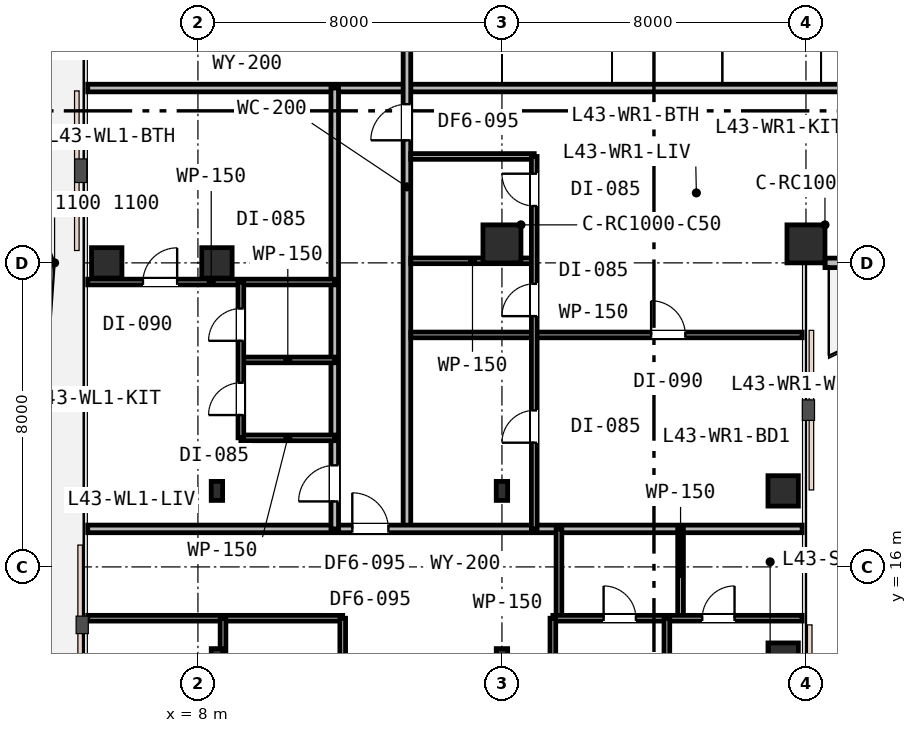
"""IFC4 building model, lengths in metres.
Left out: names, types, materials, properties, quantities, classifications, styles, units other than length and angle.
Written with IfcOpenShell. Run it as: python <this file> out.ifc"""

import sys

from ifc_helpers import new_model, si_unit, direction, frame, frame_2d, origin, origin_2d, place, context, subcontext, project, spatial, rectangle, i_section, extrude, element, fill, save


model = new_model("IFC4")
c1 = context("Model", 3, precision=1e-05, world=origin(), true_north=direction((0.0, 1.0)))
c2 = subcontext(c1, "Body", "Model", "MODEL_VIEW")
j1 = project(units=[si_unit("LENGTHUNIT", "METRE"), si_unit("PLANEANGLEUNIT", "RADIAN")], contexts=[c1])
p1 = place(None, origin())
s1 = spatial("IfcSite", under=j1, at=p1, CompositionType="ELEMENT")
p2 = place(p1, origin())
s2 = spatial("IfcBuilding", under=s1, at=p2, CompositionType="ELEMENT")
p3 = place(p2, frame((0.0, 0.0, 168.6)))
s3 = spatial("IfcBuildingStorey", under=s2, at=p3, CompositionType="ELEMENT", Elevation=168.6)
p4 = place(p3, frame((8.5, 24.0, 0.0), z_axis=(0.0, 0.0, 1.0), x_axis=(1.0, 0.0, 0.0)))
e1 = element("IfcColumn", 1, at=p4, inside=s3, PredefinedType="COLUMN", context=c2, shape_type="SweptSolid", body=[
    extrude(rectangle(XDim=0.8, YDim=0.8, at=origin_2d()), origin(), (0.0, 0.0, 1.0), 3.6),
])
for number, where, z_axis, x_axis in (
    (2, (16.0, 24.5, 0.0), (0.0, 0.0, 1.0), (1.0, 0.0, 0.0)),
    (3, (24.0, 24.5, 0.0), (0.0, 0.0, 1.0), (1.0, 0.0, 0.0)),
):
    element("IfcColumn", number, at=place(p3, frame(where, z_axis=z_axis, x_axis=x_axis)), inside=s3, PredefinedType="COLUMN", context=c2, shape_type="SweptSolid", body=[
        extrude(rectangle(XDim=1.0, YDim=1.0, at=origin_2d()), origin(), (0.0, 0.0, 1.0), 3.6),
    ])
for number, where, z_axis, x_axis in (
    (4, (5.6, 24.0, 0.0), (0.0, 0.0, 1.0), (1.0, 0.0, 0.0)),
    (5, (23.4, 13.6, 0.0), (0.0, 0.0, 1.0), (1.0, 0.0, 0.0)),
    (6, (23.4, 18.0, 0.0), (0.0, 0.0, 1.0), (1.0, 0.0, 0.0)),
):
    element("IfcColumn", number, at=place(p3, frame(where, z_axis=z_axis, x_axis=x_axis)), inside=s3, PredefinedType="COLUMN", context=c2, shape_type="SweptSolid", body=[
        extrude(rectangle(XDim=0.8, YDim=0.8, at=origin_2d()), origin(), (0.0, 0.0, 1.0), 3.6),
    ])
for number, where, z_axis, x_axis in (
    (7, (8.5, 13.6, 0.0), (0.0, 0.0, 1.0), (1.0, 0.0, 0.0)),
    (8, (16.0, 13.6, 0.0), (0.0, 0.0, 1.0), (1.0, 0.0, 0.0)),
    (9, (8.5, 18.0, 0.0), (0.0, 0.0, 1.0), (1.0, 0.0, 0.0)),
    (10, (16.0, 18.0, 0.0), (0.0, 0.0, 1.0), (1.0, 0.0, 0.0)),
):
    element("IfcColumn", number, at=place(p3, frame(where, z_axis=z_axis, x_axis=x_axis)), inside=s3, PredefinedType="COLUMN", context=c2, shape_type="SweptSolid", body=[
        extrude(i_section(OverallWidth=0.3, OverallDepth=0.5, WebThickness=0.015, FlangeThickness=0.028, FilletRadius=0.027, at=origin_2d()), origin(), (0.0, 0.0, 1.0), 3.6),
    ])
p5 = place(p3, frame((24.5, 24.0, 0.0), z_axis=(0.0, 0.0, 1.0), x_axis=(1.0, 0.0, 0.0)))
e11 = element("IfcWall", 11, at=p5, inside=s3, PredefinedType="STANDARD", context=c2, shape_type="SweptSolid", body=[
    extrude(rectangle(XDim=1.35, YDim=0.25, at=frame_2d((0.675, 0.0))), origin(), (0.0, 0.0, 1.0), 3.02),
])
p6 = place(p3, frame((5.1, 28.6, 0.0), z_axis=(0.0, 0.0, 1.0), x_axis=(1.0, 0.0, 0.0)))
e12 = element("IfcWall", 12, at=p6, inside=s3, PredefinedType="PARTITIONING", context=c2, shape_type="SweptSolid", body=[
    extrude(rectangle(XDim=8.4, YDim=0.2, at=frame_2d((4.2, 0.0))), origin(), (0.0, 0.0, 1.0), 2.92),
])
p7 = place(p3, frame((13.6, 28.6, 0.0), z_axis=(0.0, 0.0, 1.0), x_axis=(1.0, 0.0, 0.0)))
e13 = element("IfcWall", 13, at=p7, inside=s3, PredefinedType="PARTITIONING", context=c2, shape_type="SweptSolid", body=[
    extrude(rectangle(XDim=37.3, YDim=0.2, at=frame_2d((18.65, 0.0))), origin(), (0.0, 0.0, 1.0), 2.92),
])
p8 = place(p7, frame((16.025, 0.0, 0.0)))
e14 = element("IfcOpeningElement", 14, at=p8, cuts=e13, PredefinedType="OPENING", context=c2, shape_type="SweptSolid", body=[
    extrude(rectangle(XDim=0.95, YDim=2.15, at=frame_2d((0.475, 1.075))), frame((0.0, 0.11, 0.0), z_axis=(0.0, -1.0, 0.0), x_axis=(1.0, 0.0, 0.0)), (0.0, 0.0, 1.0), 0.22),
])
p9 = place(p7, frame((25.925, 0.0, 0.0)))
e15 = element("IfcOpeningElement", 15, at=p9, cuts=e13, PredefinedType="OPENING", context=c2, shape_type="SweptSolid", body=[
    extrude(rectangle(XDim=0.95, YDim=2.15, at=frame_2d((0.475, 1.075))), frame((0.0, 0.11, 0.0), z_axis=(0.0, -1.0, 0.0), x_axis=(1.0, 0.0, 0.0)), (0.0, 0.0, 1.0), 0.22),
])
p10 = place(p3, frame((13.5, 17.0, 0.0), z_axis=(0.0, 0.0, 1.0), x_axis=(0.0, 1.0, 0.0)))
e16 = element("IfcWall", 16, at=p10, inside=s3, PredefinedType="PARTITIONING", context=c2, shape_type="SweptSolid", body=[
    extrude(rectangle(XDim=18.0, YDim=0.2, at=frame_2d((9.0, 0.0))), origin(), (0.0, 0.0, 1.0), 2.92),
])
p11 = place(p10, frame((15.425, 0.0, 0.0)))
e17 = element("IfcOpeningElement", 17, at=p11, cuts=e16, PredefinedType="OPENING", context=c2, shape_type="SweptSolid", body=[
    extrude(rectangle(XDim=0.95, YDim=2.15, at=frame_2d((0.475, 1.075))), frame((0.0, 0.11, 0.0), z_axis=(0.0, -1.0, 0.0), x_axis=(1.0, 0.0, 0.0)), (0.0, 0.0, 1.0), 0.22),
])
p12 = place(p10, frame((10.225, 0.0, 0.0)))
e18 = element("IfcOpeningElement", 18, at=p12, cuts=e16, PredefinedType="OPENING", context=c2, shape_type="SweptSolid", body=[
    extrude(rectangle(XDim=0.95, YDim=2.15, at=frame_2d((0.475, 1.075))), frame((0.0, 0.11, 0.0), z_axis=(0.0, -1.0, 0.0), x_axis=(1.0, 0.0, 0.0)), (0.0, 0.0, 1.0), 0.22),
])
p13 = place(p3, frame((5.1, 17.0, 0.0), z_axis=(0.0, 0.0, 1.0), x_axis=(1.0, 0.0, 0.0)))
e19 = element("IfcWall", 19, at=p13, inside=s3, PredefinedType="PARTITIONING", context=c2, shape_type="SweptSolid", body=[
    extrude(rectangle(XDim=18.8, YDim=0.2, at=frame_2d((9.4, 0.0))), origin(), (0.0, 0.0, 1.0), 2.92),
])
p14 = place(p13, frame((6.962, 0.0, 0.0)))
e20 = element("IfcOpeningElement", 20, at=p14, cuts=e19, PredefinedType="OPENING", context=c2, shape_type="SweptSolid", body=[
    extrude(rectangle(XDim=0.95, YDim=2.15, at=frame_2d((0.475, 1.075))), frame((0.0, 0.11, 0.0), z_axis=(0.0, -1.0, 0.0), x_axis=(1.0, 0.0, 0.0)), (0.0, 0.0, 1.0), 0.22),
])
p15 = place(p3, frame((11.6, 17.0, 0.0), z_axis=(0.0, 0.0, 1.0), x_axis=(0.0, 1.0, 0.0)))
e21 = element("IfcWall", 21, at=p15, inside=s3, PredefinedType="PARTITIONING", context=c2, shape_type="SweptSolid", body=[
    extrude(rectangle(XDim=11.6, YDim=0.2, at=frame_2d((5.8, 0.0))), origin(), (0.0, 0.0, 1.0), 2.92),
])
p16 = place(p15, frame((0.723, 0.0, 0.0)))
e22 = element("IfcOpeningElement", 22, at=p16, cuts=e21, PredefinedType="OPENING", context=c2, shape_type="SweptSolid", body=[
    extrude(rectangle(XDim=0.95, YDim=2.15, at=frame_2d((0.475, 1.075))), frame((0.0, 0.11, 0.0), z_axis=(0.0, -1.0, 0.0), x_axis=(1.0, 0.0, 0.0)), (0.0, 0.0, 1.0), 0.22),
])
for number, where, z_axis, x_axis in (
    (23, (9.13, 19.396, 0.0), (0.0, 0.0, 1.0), (1.0, 0.0, 0.0)),
    (24, (9.13, 21.446, 0.0), (0.0, 0.0, 1.0), (1.0, 0.0, 0.0)),
):
    element("IfcWall", number, at=place(p3, frame(where, z_axis=z_axis, x_axis=x_axis)), inside=s3, PredefinedType="PARTITIONING", context=c2, shape_type="SweptSolid", body=[
        extrude(rectangle(XDim=2.47, YDim=0.15, at=frame_2d((1.235, 0.0))), origin(), (0.0, 0.0, 1.0), 3.33),
    ])
p17 = place(p3, frame((5.1, 23.496, 0.0), z_axis=(0.0, 0.0, 1.0), x_axis=(1.0, 0.0, 0.0)))
e25 = element("IfcWall", 25, at=p17, inside=s3, PredefinedType="PARTITIONING", context=c2, shape_type="SweptSolid", body=[
    extrude(rectangle(XDim=6.5, YDim=0.15, at=frame_2d((3.25, 0.0))), origin(), (0.0, 0.0, 1.0), 2.92),
])
p18 = place(p17, frame((1.453, 0.0, 0.0)))
e26 = element("IfcOpeningElement", 26, at=p18, cuts=e25, PredefinedType="OPENING", context=c2, shape_type="SweptSolid", body=[
    extrude(rectangle(XDim=0.9, YDim=2.15, at=frame_2d((0.45, 1.075))), frame((0.0, 0.085, 0.0), z_axis=(0.0, -1.0, 0.0), x_axis=(1.0, 0.0, 0.0)), (0.0, 0.0, 1.0), 0.17),
])
p19 = place(p3, frame((9.13, 19.396, 0.0), z_axis=(0.0, 0.0, 1.0), x_axis=(0.0, 1.0, 0.0)))
e27 = element("IfcWall", 27, at=p19, inside=s3, PredefinedType="PARTITIONING", context=c2, shape_type="SweptSolid", body=[
    extrude(rectangle(XDim=4.1, YDim=0.15, at=frame_2d((2.05, 0.0))), origin(), (0.0, 0.0, 1.0), 2.92),
])
p20 = place(p19, frame((0.6, 0.0, 0.0)))
e28 = element("IfcOpeningElement", 28, at=p20, cuts=e27, PredefinedType="OPENING", context=c2, shape_type="SweptSolid", body=[
    extrude(rectangle(XDim=0.85, YDim=2.15, at=frame_2d((0.425, 1.075))), frame((0.0, 0.085, 0.0), z_axis=(0.0, -1.0, 0.0), x_axis=(1.0, 0.0, 0.0)), (0.0, 0.0, 1.0), 0.17),
])
p21 = place(p19, frame((2.553, 0.0, 0.0)))
e29 = element("IfcOpeningElement", 29, at=p21, cuts=e27, PredefinedType="OPENING", context=c2, shape_type="SweptSolid", body=[
    extrude(rectangle(XDim=0.85, YDim=2.15, at=frame_2d((0.425, 1.075))), frame((0.0, 0.085, 0.0), z_axis=(0.0, -1.0, 0.0), x_axis=(1.0, 0.0, 0.0)), (0.0, 0.0, 1.0), 0.17),
])
p22 = place(p3, frame((13.6, 22.104, 0.0), z_axis=(0.0, 0.0, 1.0), x_axis=(1.0, 0.0, 0.0)))
e30 = element("IfcWall", 30, at=p22, inside=s3, PredefinedType="PARTITIONING", context=c2, shape_type="SweptSolid", body=[
    extrude(rectangle(XDim=10.3, YDim=0.15, at=frame_2d((5.15, 0.0))), origin(), (0.0, 0.0, 1.0), 2.92),
])
p23 = place(p22, frame((6.325, 0.0, 0.0)))
e31 = element("IfcOpeningElement", 31, at=p23, cuts=e30, PredefinedType="OPENING", context=c2, shape_type="SweptSolid", body=[
    extrude(rectangle(XDim=0.9, YDim=2.15, at=frame_2d((0.45, 1.075))), frame((0.0, 0.085, 0.0), z_axis=(0.0, -1.0, 0.0), x_axis=(1.0, 0.0, 0.0)), (0.0, 0.0, 1.0), 0.17),
])
for number, where, z_axis, x_axis in (
    (32, (13.6, 24.054, 0.0), (0.0, 0.0, 1.0), (1.0, 0.0, 0.0)),
    (33, (13.6, 26.8, 0.0), (0.0, 0.0, 1.0), (1.0, 0.0, 0.0)),
):
    element("IfcWall", number, at=place(p3, frame(where, z_axis=z_axis, x_axis=x_axis)), inside=s3, PredefinedType="PARTITIONING", context=c2, shape_type="SweptSolid", body=[
        extrude(rectangle(XDim=3.25, YDim=0.15, at=frame_2d((1.625, 0.0))), origin(), (0.0, 0.0, 1.0), 2.92),
    ])
p24 = place(p3, frame((16.85, 17.0, 0.0), z_axis=(0.0, 0.0, 1.0), x_axis=(0.0, 1.0, 0.0)))
e34 = element("IfcWall", 34, at=p24, inside=s3, PredefinedType="PARTITIONING", context=c2, shape_type="SweptSolid", body=[
    extrude(rectangle(XDim=9.8, YDim=0.15, at=frame_2d((4.9, 0.0))), origin(), (0.0, 0.0, 1.0), 2.92),
])
p25 = place(p24, frame((5.598, 0.0, 0.0)))
e35 = element("IfcOpeningElement", 35, at=p25, cuts=e34, PredefinedType="OPENING", context=c2, shape_type="SweptSolid", body=[
    extrude(rectangle(XDim=0.85, YDim=2.15, at=frame_2d((0.425, 1.075))), frame((0.0, 0.085, 0.0), z_axis=(0.0, -1.0, 0.0), x_axis=(1.0, 0.0, 0.0)), (0.0, 0.0, 1.0), 0.17),
])
p26 = place(p24, frame((8.496, 0.0, 0.0)))
e36 = element("IfcOpeningElement", 36, at=p26, cuts=e34, PredefinedType="OPENING", context=c2, shape_type="SweptSolid", body=[
    extrude(rectangle(XDim=0.85, YDim=2.15, at=frame_2d((0.425, 1.075))), frame((0.0, 0.085, 0.0), z_axis=(0.0, -1.0, 0.0), x_axis=(1.0, 0.0, 0.0)), (0.0, 0.0, 1.0), 0.17),
])
p27 = place(p24, frame((2.268, 0.0, 0.0)))
e37 = element("IfcOpeningElement", 37, at=p27, cuts=e34, PredefinedType="OPENING", context=c2, shape_type="SweptSolid", body=[
    extrude(rectangle(XDim=0.85, YDim=2.15, at=frame_2d((0.425, 1.075))), frame((0.0, 0.085, 0.0), z_axis=(0.0, -1.0, 0.0), x_axis=(1.0, 0.0, 0.0)), (0.0, 0.0, 1.0), 0.17),
])
p28 = place(p3, frame((17.5, 14.65, 0.0), z_axis=(0.0, 0.0, 1.0), x_axis=(0.0, 1.0, 0.0)))
e38 = element("IfcWall", 38, at=p28, inside=s3, PredefinedType="PARTITIONING", context=c2, shape_type="SweptSolid", body=[
    extrude(rectangle(XDim=2.35, YDim=0.15, at=frame_2d((1.175, 0.0))), origin(), (0.0, 0.0, 1.0), 3.33),
])
p29 = place(p3, frame((20.7, 14.65, 0.0), z_axis=(0.0, 0.0, 1.0), x_axis=(0.0, 1.0, 0.0)))
e39 = element("IfcWall", 39, at=p29, inside=s3, PredefinedType="PARTITIONING", context=c2, shape_type="SweptSolid", body=[
    extrude(rectangle(XDim=2.35, YDim=0.15, at=frame_2d((1.175, 0.0))), origin(), (0.0, 0.0, 1.0), 3.07),
])
p30 = place(p3, frame((17.34, 14.65, 0.0), z_axis=(0.0, 0.0, 1.0), x_axis=(1.0, 0.0, 0.0)))
e40 = element("IfcWall", 40, at=p30, inside=s3, PredefinedType="PARTITIONING", context=c2, shape_type="SweptSolid", body=[
    extrude(rectangle(XDim=6.56, YDim=0.15, at=frame_2d((3.28, 0.0))), origin(), (0.0, 0.0, 1.0), 3.02),
])
p31 = place(p30, frame((1.335, 0.0, 0.0)))
e41 = element("IfcOpeningElement", 41, at=p31, cuts=e40, PredefinedType="OPENING", context=c2, shape_type="SweptSolid", body=[
    extrude(rectangle(XDim=0.85, YDim=2.15, at=frame_2d((0.425, 1.075))), frame((0.0, 0.085, 0.0), z_axis=(0.0, -1.0, 0.0), x_axis=(1.0, 0.0, 0.0)), (0.0, 0.0, 1.0), 0.17),
])
p32 = place(p30, frame((3.93, 0.0, 0.0)))
e42 = element("IfcOpeningElement", 42, at=p32, cuts=e40, PredefinedType="OPENING", context=c2, shape_type="SweptSolid", body=[
    extrude(rectangle(XDim=0.85, YDim=2.15, at=frame_2d((0.425, 1.075))), frame((0.0, 0.085, 0.0), z_axis=(0.0, -1.0, 0.0), x_axis=(1.0, 0.0, 0.0)), (0.0, 0.0, 1.0), 0.17),
])
p33 = place(p3, frame((5.1, 14.65, 0.0), z_axis=(0.0, 0.0, 1.0), x_axis=(1.0, 0.0, 0.0)))
e43 = element("IfcWall", 43, at=p33, inside=s3, PredefinedType="PARTITIONING", context=c2, shape_type="SweptSolid", body=[
    extrude(rectangle(XDim=6.71, YDim=0.15, at=frame_2d((3.355, 0.0))), origin(), (0.0, 0.0, 1.0), 2.92),
])
p34 = place(p3, frame((8.66, 5.1, 0.0), z_axis=(0.0, 0.0, 1.0), x_axis=(0.0, 1.0, 0.0)))
e44 = element("IfcWall", 44, at=p34, inside=s3, PredefinedType="PARTITIONING", context=c2, shape_type="SweptSolid", body=[
    extrude(rectangle(XDim=9.55, YDim=0.15, at=frame_2d((4.775, 0.0))), origin(), (0.0, 0.0, 1.0), 2.92),
])
p35 = place(p34, frame((4.779, 0.0, 0.0)))
e45 = element("IfcOpeningElement", 45, at=p35, cuts=e44, PredefinedType="OPENING", context=c2, shape_type="SweptSolid", body=[
    extrude(rectangle(XDim=0.9, YDim=2.15, at=frame_2d((0.45, 1.075))), frame((0.0, 0.085, 0.0), z_axis=(0.0, -1.0, 0.0), x_axis=(1.0, 0.0, 0.0)), (0.0, 0.0, 1.0), 0.17),
])
p36 = place(p3, frame((20.34, 5.1, 0.0), z_axis=(0.0, 0.0, 1.0), x_axis=(0.0, 1.0, 0.0)))
e46 = element("IfcWall", 46, at=p36, inside=s3, PredefinedType="PARTITIONING", context=c2, shape_type="SweptSolid", body=[
    extrude(rectangle(XDim=9.55, YDim=0.15, at=frame_2d((4.775, 0.0))), origin(), (0.0, 0.0, 1.0), 2.92),
])
p37 = place(p36, frame((4.325, 0.0, 0.0)))
e47 = element("IfcOpeningElement", 47, at=p37, cuts=e46, PredefinedType="OPENING", context=c2, shape_type="SweptSolid", body=[
    extrude(rectangle(XDim=0.9, YDim=2.15, at=frame_2d((0.45, 1.075))), frame((0.0, 0.085, 0.0), z_axis=(0.0, -1.0, 0.0), x_axis=(1.0, 0.0, 0.0)), (0.0, 0.0, 1.0), 0.17),
])
p38 = place(p3, frame((17.34, 5.1, 0.0), z_axis=(0.0, 0.0, 1.0), x_axis=(0.0, 1.0, 0.0)))
e48 = element("IfcWall", 48, at=p38, inside=s3, PredefinedType="PARTITIONING", context=c2, shape_type="SweptSolid", body=[
    extrude(rectangle(XDim=9.55, YDim=0.15, at=frame_2d((4.775, 0.0))), origin(), (0.0, 0.0, 1.0), 2.92),
])
p39 = place(p38, frame((4.779, 0.0, 0.0)))
e49 = element("IfcOpeningElement", 49, at=p39, cuts=e48, PredefinedType="OPENING", context=c2, shape_type="SweptSolid", body=[
    extrude(rectangle(XDim=0.9, YDim=2.15, at=frame_2d((0.45, 1.075))), frame((0.0, 0.085, 0.0), z_axis=(0.0, -1.0, 0.0), x_axis=(1.0, 0.0, 0.0)), (0.0, 0.0, 1.0), 0.17),
])
p40 = place(p3, frame((11.81, 5.1, 0.0), z_axis=(0.0, 0.0, 1.0), x_axis=(0.0, 1.0, 0.0)))
e50 = element("IfcWall", 50, at=p40, inside=s3, PredefinedType="PARTITIONING", context=c2, shape_type="SweptSolid", body=[
    extrude(rectangle(XDim=9.55, YDim=0.15, at=frame_2d((4.775, 0.0))), origin(), (0.0, 0.0, 1.0), 2.92),
])
p41 = place(p40, frame((4.325, 0.0, 0.0)))
e51 = element("IfcOpeningElement", 51, at=p41, cuts=e50, PredefinedType="OPENING", context=c2, shape_type="SweptSolid", body=[
    extrude(rectangle(XDim=0.9, YDim=2.15, at=frame_2d((0.45, 1.075))), frame((0.0, 0.085, 0.0), z_axis=(0.0, -1.0, 0.0), x_axis=(1.0, 0.0, 0.0)), (0.0, 0.0, 1.0), 0.17),
])
p42 = place(p16, origin())
e52 = element("IfcDoor", 52, at=p42, inside=s3, OperationType="SINGLE_SWING_LEFT", PredefinedType="DOOR", context=c2, shape_type="SweptSolid", body=[
    extrude(rectangle(XDim=0.95, YDim=2.15, at=frame_2d((0.475, 1.075))), frame((0.0, 0.025, 0.0), z_axis=(0.0, -1.0, 0.0), x_axis=(1.0, 0.0, 0.0)), (0.0, 0.0, 1.0), 0.05),
])
fill(e22, e52)
p43 = place(p20, origin())
e53 = element("IfcDoor", 53, at=p43, inside=s3, OperationType="SINGLE_SWING_LEFT", PredefinedType="DOOR", context=c2, shape_type="SweptSolid", body=[
    extrude(rectangle(XDim=0.85, YDim=2.15, at=frame_2d((0.425, 1.075))), frame((0.0, 0.025, 0.0), z_axis=(0.0, -1.0, 0.0), x_axis=(1.0, 0.0, 0.0)), (0.0, 0.0, 1.0), 0.05),
])
fill(e28, e53)
p44 = place(p21, origin())
e54 = element("IfcDoor", 54, at=p44, inside=s3, OperationType="SINGLE_SWING_LEFT", PredefinedType="DOOR", context=c2, shape_type="SweptSolid", body=[
    extrude(rectangle(XDim=0.85, YDim=2.15, at=frame_2d((0.425, 1.075))), frame((0.0, 0.025, 0.0), z_axis=(0.0, -1.0, 0.0), x_axis=(1.0, 0.0, 0.0)), (0.0, 0.0, 1.0), 0.05),
])
fill(e29, e54)
p45 = place(p18, origin())
e55 = element("IfcDoor", 55, at=p45, inside=s3, OperationType="SINGLE_SWING_RIGHT", PredefinedType="DOOR", context=c2, shape_type="SweptSolid", body=[
    extrude(rectangle(XDim=0.9, YDim=2.15, at=frame_2d((0.45, 1.075))), frame((0.0, 0.025, 0.0), z_axis=(0.0, -1.0, 0.0), x_axis=(1.0, 0.0, 0.0)), (0.0, 0.0, 1.0), 0.05),
])
fill(e26, e55)
p46 = place(p12, origin())
e56 = element("IfcDoor", 56, at=p46, inside=s3, OperationType="SINGLE_SWING_LEFT", PredefinedType="DOOR", context=c2, shape_type="SweptSolid", body=[
    extrude(rectangle(XDim=0.95, YDim=2.15, at=frame_2d((0.475, 1.075))), frame((0.0, 0.025, 0.0), z_axis=(0.0, -1.0, 0.0), x_axis=(1.0, 0.0, 0.0)), (0.0, 0.0, 1.0), 0.05),
])
fill(e18, e56)
p47 = place(p25, origin())
e57 = element("IfcDoor", 57, at=p47, inside=s3, OperationType="SINGLE_SWING_LEFT", PredefinedType="DOOR", context=c2, shape_type="SweptSolid", body=[
    extrude(rectangle(XDim=0.85, YDim=2.15, at=frame_2d((0.425, 1.075))), frame((0.0, 0.025, 0.0), z_axis=(0.0, -1.0, 0.0), x_axis=(1.0, 0.0, 0.0)), (0.0, 0.0, 1.0), 0.05),
])
fill(e35, e57)
p48 = place(p26, origin())
e58 = element("IfcDoor", 58, at=p48, inside=s3, OperationType="SINGLE_SWING_RIGHT", PredefinedType="DOOR", context=c2, shape_type="SweptSolid", body=[
    extrude(rectangle(XDim=0.85, YDim=2.15, at=frame_2d((0.425, 1.075))), frame((0.0, 0.025, 0.0), z_axis=(0.0, -1.0, 0.0), x_axis=(1.0, 0.0, 0.0)), (0.0, 0.0, 1.0), 0.05),
])
fill(e36, e58)
p49 = place(p27, origin())
e59 = element("IfcDoor", 59, at=p49, inside=s3, OperationType="SINGLE_SWING_LEFT", PredefinedType="DOOR", context=c2, shape_type="SweptSolid", body=[
    extrude(rectangle(XDim=0.85, YDim=2.15, at=frame_2d((0.425, 1.075))), frame((0.0, 0.025, 0.0), z_axis=(0.0, -1.0, 0.0), x_axis=(1.0, 0.0, 0.0)), (0.0, 0.0, 1.0), 0.05),
])
fill(e37, e59)
p50 = place(p23, origin())
e60 = element("IfcDoor", 60, at=p50, inside=s3, OperationType="SINGLE_SWING_LEFT", PredefinedType="DOOR", context=c2, shape_type="SweptSolid", body=[
    extrude(rectangle(XDim=0.9, YDim=2.15, at=frame_2d((0.45, 1.075))), frame((0.0, 0.025, 0.0), z_axis=(0.0, -1.0, 0.0), x_axis=(1.0, 0.0, 0.0)), (0.0, 0.0, 1.0), 0.05),
])
fill(e31, e60)
p51 = place(p14, origin())
e61 = element("IfcDoor", 61, at=p51, inside=s3, OperationType="SINGLE_SWING_LEFT", PredefinedType="DOOR", context=c2, shape_type="SweptSolid", body=[
    extrude(rectangle(XDim=0.95, YDim=2.15, at=frame_2d((0.475, 1.075))), frame((0.0, 0.025, 0.0), z_axis=(0.0, -1.0, 0.0), x_axis=(1.0, 0.0, 0.0)), (0.0, 0.0, 1.0), 0.05),
])
fill(e20, e61)
p52 = place(p31, origin())
e62 = element("IfcDoor", 62, at=p52, inside=s3, OperationType="SINGLE_SWING_LEFT", PredefinedType="DOOR", context=c2, shape_type="SweptSolid", body=[
    extrude(rectangle(XDim=0.85, YDim=2.15, at=frame_2d((0.425, 1.075))), frame((0.0, 0.025, 0.0), z_axis=(0.0, -1.0, 0.0), x_axis=(1.0, 0.0, 0.0)), (0.0, 0.0, 1.0), 0.05),
])
fill(e41, e62)
p53 = place(p32, origin())
e63 = element("IfcDoor", 63, at=p53, inside=s3, OperationType="SINGLE_SWING_RIGHT", PredefinedType="DOOR", context=c2, shape_type="SweptSolid", body=[
    extrude(rectangle(XDim=0.85, YDim=2.15, at=frame_2d((0.425, 1.075))), frame((0.0, 0.025, 0.0), z_axis=(0.0, -1.0, 0.0), x_axis=(1.0, 0.0, 0.0)), (0.0, 0.0, 1.0), 0.05),
])
fill(e42, e63)
save(model, sys.argv[1])
